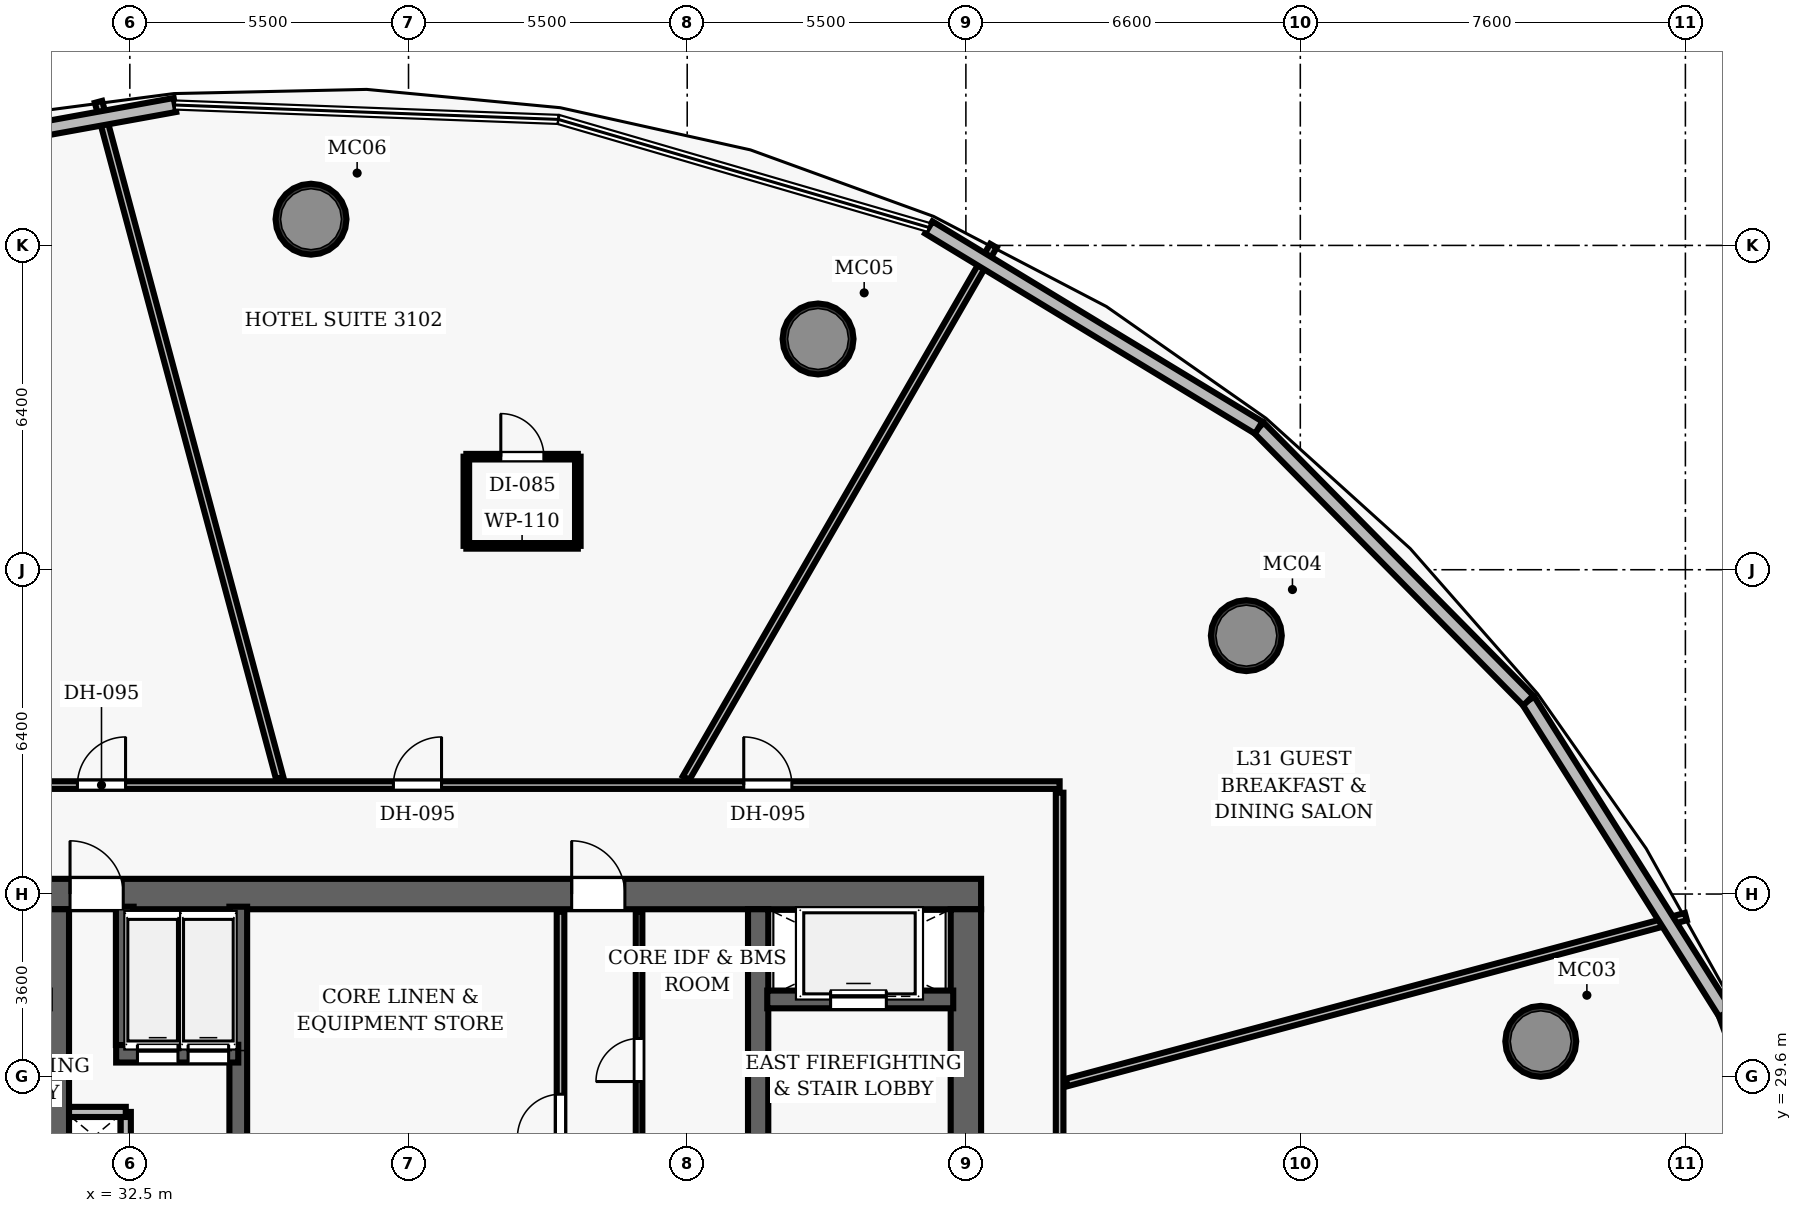
"""IFC4 building model, lengths in metres.
Left out: names, types, materials, properties, quantities, classifications, styles, units other than length and angle.
Written with IfcOpenShell. Run it as: python <this file> out.ifc"""

import sys

from ifc_helpers import new_model, si_unit, direction, frame, frame_2d, origin, origin_2d, place, context, subcontext, project, spatial, rectangle, hollow_circle, extrude, element, fill, save


model = new_model("IFC4")
c1 = context("Model", 3, precision=1e-05, world=origin(), true_north=direction((0.0, 1.0)))
c2 = subcontext(c1, "Body", "Model", "MODEL_VIEW")
j1 = project(units=[si_unit("LENGTHUNIT", "METRE"), si_unit("PLANEANGLEUNIT", "RADIAN")], contexts=[c1])
p1 = place(None, origin())
s1 = spatial("IfcSite", under=j1, at=p1, CompositionType="ELEMENT")
p2 = place(p1, origin())
s2 = spatial("IfcBuilding", under=s1, at=p2, CompositionType="ELEMENT")
p3 = place(p2, frame((0.0, 0.0, 127.3)))
s3 = spatial("IfcBuildingStorey", under=s2, at=p3, CompositionType="ELEMENT", Elevation=127.3)
p4 = place(p3, frame((26.7, 33.2, 0.0), z_axis=(0.0, 0.0, 1.0), x_axis=(1.0, 0.0, 0.0)))
e1 = element("IfcWall", 1, at=p4, inside=s3, PredefinedType="SHEAR", context=c2, shape_type="SweptSolid", body=[
    extrude(rectangle(XDim=22.6, YDim=0.6, at=frame_2d((11.3, 0.0))), origin(), (0.0, 0.0, 1.0), 3.5),
])
p5 = place(p4, frame((4.62, 0.0, 0.0)))
e2 = element("IfcOpeningElement", 2, at=p5, cuts=e1, PredefinedType="OPENING", context=c2, shape_type="SweptSolid", body=[
    extrude(rectangle(XDim=1.05, YDim=2.15, at=frame_2d((0.525, 1.075))), frame((0.0, 0.31, 0.0), z_axis=(0.0, -1.0, 0.0), x_axis=(1.0, 0.0, 0.0)), (0.0, 0.0, 1.0), 0.62),
])
p6 = place(p4, frame((14.52, 0.0, 0.0)))
e3 = element("IfcOpeningElement", 3, at=p6, cuts=e1, PredefinedType="OPENING", context=c2, shape_type="SweptSolid", body=[
    extrude(rectangle(XDim=1.05, YDim=2.15, at=frame_2d((0.525, 1.075))), frame((0.0, 0.31, 0.0), z_axis=(0.0, -1.0, 0.0), x_axis=(1.0, 0.0, 0.0)), (0.0, 0.0, 1.0), 0.62),
])
p7 = place(p3, frame((49.0, 19.1, 0.0), z_axis=(0.0, 0.0, 1.0), x_axis=(0.0, 1.0, 0.0)))
e4 = element("IfcWall", 4, at=p7, inside=s3, PredefinedType="SHEAR", context=c2, shape_type="SweptSolid", body=[
    extrude(rectangle(XDim=13.8, YDim=0.6, at=frame_2d((6.9, 0.0))), origin(), (0.0, 0.0, 1.0), 3.5),
])
p8 = place(p7, frame((8.2, 0.0, 0.0)))
e5 = element("IfcOpeningElement", 5, at=p8, cuts=e4, PredefinedType="OPENING", context=c2, shape_type="SweptSolid", body=[
    extrude(rectangle(XDim=1.05, YDim=2.15, at=frame_2d((0.525, 1.075))), frame((0.0, 0.31, 0.0), z_axis=(0.0, -1.0, 0.0), x_axis=(1.0, 0.0, 0.0)), (0.0, 0.0, 1.0), 0.62),
])
for number, where, z_axis, x_axis in (
    (6, (31.1, 19.1, 0.0), (0.0, 0.0, 1.0), (0.0, 1.0, 0.0)),
    (7, (44.9, 19.1, 0.0), (0.0, 0.0, 1.0), (0.0, 1.0, 0.0)),
):
    element("IfcWall", number, at=place(p3, frame(where, z_axis=z_axis, x_axis=x_axis)), inside=s3, PredefinedType="SHEAR", context=c2, shape_type="SweptSolid", body=[
        extrude(rectangle(XDim=13.8, YDim=0.4, at=frame_2d((6.9, 0.0))), origin(), (0.0, 0.0, 1.0), 3.5),
    ])
for number, where, z_axis, x_axis in (
    (8, (60.346, 30.293, 0.0), (0.0, 0.0, 1.0), (1.0, 0.0, 0.0)),
    (9, (54.535, 38.299, 0.0), (0.0, 0.0, 1.0), (1.0, 0.0, 0.0)),
    (10, (46.083, 44.154, 0.0), (0.0, 0.0, 1.0), (1.0, 0.0, 0.0)),
    (11, (36.076, 46.517, 0.0), (0.0, 0.0, 1.0), (1.0, 0.0, 0.0)),
):
    element("IfcColumn", number, at=place(p3, frame(where, z_axis=z_axis, x_axis=x_axis)), inside=s3, PredefinedType="COLUMN", context=c2, shape_type="SweptSolid", body=[
        extrude(hollow_circle(Radius=0.7, WallThickness=0.055, at=origin_2d()), origin(), (0.0, 0.0, 1.0), 3.5),
    ])
p9 = place(p3, frame((45.08, 31.12, 0.0), z_axis=(0.0, 0.0, 1.0), x_axis=(1.0, 0.0, 0.0)))
e12 = element("IfcWall", 12, at=p9, inside=s3, PredefinedType="SHEAR", context=c2, shape_type="SweptSolid", body=[
    extrude(rectangle(XDim=3.67, YDim=0.35, at=frame_2d((1.835, 0.0))), origin(), (0.0, 0.0, 1.0), 2.675),
])
p10 = place(p9, frame((1.25, 0.0, 0.0)))
e13 = element("IfcOpeningElement", 13, at=p10, cuts=e12, PredefinedType="OPENING", context=c2, shape_type="SweptSolid", body=[
    extrude(rectangle(XDim=1.1, YDim=2.15, at=frame_2d((0.55, 1.075))), frame((0.0, 0.185, 0.0), z_axis=(0.0, -1.0, 0.0), x_axis=(1.0, 0.0, 0.0)), (0.0, 0.0, 1.0), 0.37),
])
p11 = place(p3, frame((34.64, 26.69, 0.0), z_axis=(0.0, 0.0, 1.0), x_axis=(0.0, 1.0, 0.0)))
e14 = element("IfcWall", 14, at=p11, inside=s3, PredefinedType="SHEAR", context=c2, shape_type="SweptSolid", body=[
    extrude(rectangle(XDim=6.26, YDim=0.35, at=frame_2d((3.13, 0.0))), origin(), (0.0, 0.0, 1.0), 3.5),
])
p12 = place(p3, frame((32.23, 30.05, 0.0), z_axis=(0.0, 0.0, 1.0), x_axis=(1.0, 0.0, 0.0)))
e15 = element("IfcWall", 15, at=p12, inside=s3, PredefinedType="SHEAR", context=c2, shape_type="SweptSolid", body=[
    extrude(rectangle(XDim=2.41, YDim=0.35, at=frame_2d((1.205, 0.0))), origin(), (0.0, 0.0, 1.0), 2.675),
])
p13 = place(p12, frame((0.42, 0.0, 0.0)))
e16 = element("IfcOpeningElement", 16, at=p13, cuts=e15, PredefinedType="OPENING", context=c2, shape_type="SweptSolid", body=[
    extrude(rectangle(XDim=0.8, YDim=2.15, at=frame_2d((0.4, 1.075))), frame((0.0, 0.185, 0.0), z_axis=(0.0, -1.0, 0.0), x_axis=(1.0, 0.0, 0.0)), (0.0, 0.0, 1.0), 0.37),
])
p14 = place(p12, frame((1.42, 0.0, 0.0)))
e17 = element("IfcOpeningElement", 17, at=p14, cuts=e15, PredefinedType="OPENING", context=c2, shape_type="SweptSolid", body=[
    extrude(rectangle(XDim=0.8, YDim=2.15, at=frame_2d((0.4, 1.075))), frame((0.0, 0.185, 0.0), z_axis=(0.0, -1.0, 0.0), x_axis=(1.0, 0.0, 0.0)), (0.0, 0.0, 1.0), 0.37),
])
p15 = place(p3, frame((32.4, 30.22, 0.0), z_axis=(0.0, 0.0, 1.0), x_axis=(0.0, 1.0, 0.0)))
e18 = element("IfcWall", 18, at=p15, inside=s3, PredefinedType="SHEAR", context=c2, shape_type="SweptSolid", body=[
    extrude(rectangle(XDim=2.73, YDim=0.35, at=frame_2d((1.365, 0.0))), origin(), (0.0, 0.0, 1.0), 2.675),
])
p16 = place(p3, frame((32.42, 26.86, 0.0), z_axis=(0.0, 0.0, 1.0), x_axis=(0.0, 1.0, 0.0)))
e19 = element("IfcWall", 19, at=p16, inside=s3, PredefinedType="PARTITIONING", context=c2, shape_type="SweptSolid", body=[
    extrude(rectangle(XDim=2.04, YDim=0.2, at=frame_2d((1.02, 0.0))), origin(), (0.0, 0.0, 1.0), 2.675),
])
p17 = place(p16, frame((0.14, 0.0, 0.0)))
e20 = element("IfcOpeningElement", 20, at=p17, cuts=e19, PredefinedType="OPENING", context=c2, shape_type="SweptSolid", body=[
    extrude(rectangle(XDim=0.8, YDim=2.05, at=frame_2d((0.4, 1.025))), frame((0.0, 0.11, 0.0), z_axis=(0.0, -1.0, 0.0), x_axis=(1.0, 0.0, 0.0)), (0.0, 0.0, 1.0), 0.22),
])
p18 = place(p3, frame((31.3, 28.9, 0.0), z_axis=(0.0, 0.0, 1.0), x_axis=(1.0, 0.0, 0.0)))
e21 = element("IfcWall", 21, at=p18, inside=s3, PredefinedType="PARTITIONING", context=c2, shape_type="SweptSolid", body=[
    extrude(rectangle(XDim=1.12, YDim=0.2, at=frame_2d((0.56, 0.0))), origin(), (0.0, 0.0, 1.0), 2.675),
])
p19 = place(p3, frame((41.0, 23.05, 0.0), z_axis=(0.0, 0.0, 1.0), x_axis=(0.0, 1.0, 0.0)))
e22 = element("IfcWall", 22, at=p19, inside=s3, PredefinedType="PARTITIONING", context=c2, shape_type="SweptSolid", body=[
    extrude(rectangle(XDim=9.8, YDim=0.15, at=frame_2d((4.9, 0.0))), origin(), (0.0, 0.0, 1.0), 2.675),
])
p20 = place(p19, frame((5.35, 0.0, 0.0)))
e23 = element("IfcOpeningElement", 23, at=p20, cuts=e22, PredefinedType="OPENING", context=c2, shape_type="SweptSolid", body=[
    extrude(rectangle(XDim=0.85, YDim=2.1, at=frame_2d((0.425, 1.05))), frame((0.0, 0.085, 0.0), z_axis=(0.0, -1.0, 0.0), x_axis=(1.0, 0.0, 0.0)), (0.0, 0.0, 1.0), 0.17),
])
p21 = place(p19, frame((0.45, 0.0, 0.0)))
e24 = element("IfcOpeningElement", 24, at=p21, cuts=e22, PredefinedType="OPENING", context=c2, shape_type="SweptSolid", body=[
    extrude(rectangle(XDim=0.85, YDim=2.1, at=frame_2d((0.425, 1.05))), frame((0.0, 0.085, 0.0), z_axis=(0.0, -1.0, 0.0), x_axis=(1.0, 0.0, 0.0)), (0.0, 0.0, 1.0), 0.17),
])
p22 = place(p3, frame((42.55, 28.1, 0.0), z_axis=(0.0, 0.0, 1.0), x_axis=(0.0, 1.0, 0.0)))
e25 = element("IfcWall", 25, at=p22, inside=s3, PredefinedType="PARTITIONING", context=c2, shape_type="SweptSolid", body=[
    extrude(rectangle(XDim=4.75, YDim=0.13, at=frame_2d((2.375, 0.0))), origin(), (0.0, 0.0, 1.0), 2.675),
])
p23 = place(p22, frame((1.4, 0.0, 0.0)))
e26 = element("IfcOpeningElement", 26, at=p23, cuts=e25, PredefinedType="OPENING", context=c2, shape_type="SweptSolid", body=[
    extrude(rectangle(XDim=0.85, YDim=2.1, at=frame_2d((0.425, 1.05))), frame((0.0, 0.075, 0.0), z_axis=(0.0, -1.0, 0.0), x_axis=(1.0, 0.0, 0.0)), (0.0, 0.0, 1.0), 0.15),
])
p24 = place(p3, frame((24.85, 35.35, 0.0), z_axis=(0.0, 0.0, 1.0), x_axis=(1.0, 0.0, 0.0)))
e27 = element("IfcWall", 27, at=p24, inside=s3, PredefinedType="PARTITIONING", context=c2, shape_type="SweptSolid", body=[
    extrude(rectangle(XDim=26.0, YDim=0.15, at=frame_2d((13.0, 0.0))), origin(), (0.0, 0.0, 1.0), 2.675),
])
p25 = place(p24, frame((19.766, 0.0, 0.0)))
e28 = element("IfcOpeningElement", 28, at=p25, cuts=e27, PredefinedType="OPENING", context=c2, shape_type="SweptSolid", body=[
    extrude(rectangle(XDim=0.95, YDim=2.15, at=frame_2d((0.475, 1.075))), frame((0.0, 0.085, 0.0), z_axis=(0.0, -1.0, 0.0), x_axis=(1.0, 0.0, 0.0)), (0.0, 0.0, 1.0), 0.17),
])
p26 = place(p24, frame((12.852, 0.0, 0.0)))
e29 = element("IfcOpeningElement", 29, at=p26, cuts=e27, PredefinedType="OPENING", context=c2, shape_type="SweptSolid", body=[
    extrude(rectangle(XDim=0.95, YDim=2.15, at=frame_2d((0.475, 1.075))), frame((0.0, 0.085, 0.0), z_axis=(0.0, -1.0, 0.0), x_axis=(1.0, 0.0, 0.0)), (0.0, 0.0, 1.0), 0.17),
])
p27 = place(p24, frame((6.616, 0.0, 0.0)))
e30 = element("IfcOpeningElement", 30, at=p27, cuts=e27, PredefinedType="OPENING", context=c2, shape_type="SweptSolid", body=[
    extrude(rectangle(XDim=0.95, YDim=2.15, at=frame_2d((0.475, 1.075))), frame((0.0, 0.085, 0.0), z_axis=(0.0, -1.0, 0.0), x_axis=(1.0, 0.0, 0.0)), (0.0, 0.0, 1.0), 0.17),
])
p28 = place(p3, frame((50.85, 27.08, 0.0), z_axis=(0.0, 0.0, 1.0), x_axis=(0.0, 1.0, 0.0)))
e31 = element("IfcWall", 31, at=p28, inside=s3, PredefinedType="PARTITIONING", context=c2, shape_type="SweptSolid", body=[
    extrude(rectangle(XDim=8.12, YDim=0.15, at=frame_2d((4.06, 0.0))), origin(), (0.0, 0.0, 1.0), 2.675),
])
p29 = place(p3, frame((50.99, 29.481, 0.0), z_axis=(0.0, 0.0, 1.0), x_axis=(0.965926429522, 0.258816793797, 0.0)))
e32 = element("IfcWall", 32, at=p29, inside=s3, PredefinedType="PARTITIONING", context=c2, shape_type="SweptSolid", body=[
    extrude(rectangle(XDim=12.651, YDim=0.15, at=frame_2d((6.325, 0.0))), origin(), (0.0, 0.0, 1.0), 2.675),
])
p30 = place(p3, frame((43.479, 35.49, 0.0), z_axis=(0.0, 0.0, 1.0), x_axis=(0.50000357382, 0.866023340428, 0.0)))
e33 = element("IfcWall", 33, at=p30, inside=s3, PredefinedType="PARTITIONING", context=c2, shape_type="SweptSolid", body=[
    extrude(rectangle(XDim=12.128, YDim=0.15, at=frame_2d((6.064, 0.0))), origin(), (0.0, 0.0, 1.0), 2.675),
])
p31 = place(p3, frame((35.457, 35.49, 0.0), z_axis=(0.0, 0.0, 1.0), x_axis=(-0.258827369618, 0.965923595704, 0.0)))
e34 = element("IfcWall", 34, at=p31, inside=s3, PredefinedType="PARTITIONING", context=c2, shape_type="SweptSolid", body=[
    extrude(rectangle(XDim=13.814, YDim=0.15, at=frame_2d((6.907, 0.0))), origin(), (0.0, 0.0, 1.0), 2.675),
])
p32 = place(p3, frame((39.141, 40.071, 0.0), z_axis=(0.0, 0.0, 1.0), x_axis=(1.0, 0.0, 0.0)))
e35 = element("IfcWall", 35, at=p32, inside=s3, PredefinedType="PARTITIONING", context=c2, shape_type="SweptSolid", body=[
    extrude(rectangle(XDim=2.2, YDim=0.11, at=frame_2d((1.1, 0.0))), origin(), (0.0, 0.0, 1.0), 2.675),
])
p33 = place(p3, frame((39.141, 41.831, 0.0), z_axis=(0.0, 0.0, 1.0), x_axis=(1.0, 0.0, 0.0)))
e36 = element("IfcWall", 36, at=p33, inside=s3, PredefinedType="PARTITIONING", context=c2, shape_type="SweptSolid", body=[
    extrude(rectangle(XDim=2.2, YDim=0.11, at=frame_2d((1.1, 0.0))), origin(), (0.0, 0.0, 1.0), 2.675),
])
p34 = place(p33, frame((0.68, 0.0, 0.0)))
e37 = element("IfcOpeningElement", 37, at=p34, cuts=e36, PredefinedType="OPENING", context=c2, shape_type="SweptSolid", body=[
    extrude(rectangle(XDim=0.85, YDim=2.1, at=frame_2d((0.425, 1.05))), frame((0.0, 0.065, 0.0), z_axis=(0.0, -1.0, 0.0), x_axis=(1.0, 0.0, 0.0)), (0.0, 0.0, 1.0), 0.13),
])
for number, where, z_axis, x_axis in (
    (38, (39.141, 40.071, 0.0), (0.0, 0.0, 1.0), (0.0, 1.0, 0.0)),
    (39, (41.341, 40.071, 0.0), (0.0, 0.0, 1.0), (0.0, 1.0, 0.0)),
):
    element("IfcWall", number, at=place(p3, frame(where, z_axis=z_axis, x_axis=x_axis)), inside=s3, PredefinedType="PARTITIONING", context=c2, shape_type="SweptSolid", body=[
        extrude(rectangle(XDim=1.76, YDim=0.11, at=frame_2d((0.88, 0.0))), origin(), (0.0, 0.0, 1.0), 2.675),
    ])
p35 = place(p3, frame((63.988, 30.85, 0.0), z_axis=(0.0, 0.0, 1.0), x_axis=(0.347548177942, -0.937662126786, 0.0)))
e40 = element("IfcWall", 40, at=p35, inside=s3, PredefinedType="SOLIDWALL", context=c2, shape_type="SweptSolid", body=[
    extrude(rectangle(XDim=6.665, YDim=0.28, at=frame_2d((3.333, 0.0))), origin(), (0.0, 0.0, 1.0), 3.26),
])
p36 = place(p3, frame((60.099, 37.019, 0.0), z_axis=(0.0, 0.0, 1.0), x_axis=(0.533224356751, -0.845973868017, 0.0)))
e41 = element("IfcWall", 41, at=p36, inside=s3, PredefinedType="SOLIDWALL", context=c2, shape_type="SweptSolid", body=[
    extrude(rectangle(XDim=7.292, YDim=0.28, at=frame_2d((3.646, 0.0))), origin(), (0.0, 0.0, 1.0), 3.26),
])
p37 = place(p3, frame((54.78, 42.404, 0.0), z_axis=(0.0, 0.0, 1.0), x_axis=(0.702787728891, -0.711399612117, 0.0)))
e42 = element("IfcWall", 42, at=p37, inside=s3, PredefinedType="SOLIDWALL", context=c2, shape_type="SweptSolid", body=[
    extrude(rectangle(XDim=7.569, YDim=0.28, at=frame_2d((3.785, 0.0))), origin(), (0.0, 0.0, 1.0), 3.26),
])
p38 = place(p3, frame((48.268, 46.355, 0.0), z_axis=(0.0, 0.0, 1.0), x_axis=(0.854928651423, -0.518745603332, 0.0)))
e43 = element("IfcWall", 43, at=p38, inside=s3, PredefinedType="SOLIDWALL", context=c2, shape_type="SweptSolid", body=[
    extrude(rectangle(XDim=7.617, YDim=0.28, at=frame_2d((3.809, 0.0))), origin(), (0.0, 0.0, 1.0), 3.26),
])
p39 = place(p3, frame((26.216, 47.47, 0.0), z_axis=(0.0, 0.0, 1.0), x_axis=(0.983958718809, 0.178396299514, 0.0)))
e44 = element("IfcWall", 44, at=p39, inside=s3, PredefinedType="SOLIDWALL", context=c2, shape_type="SweptSolid", body=[
    extrude(rectangle(XDim=7.292, YDim=0.28, at=frame_2d((3.646, 0.0))), origin(), (0.0, 0.0, 1.0), 3.26),
])
p40 = place(p5, origin())
e45 = element("IfcDoor", 45, at=p40, inside=s3, OperationType="SINGLE_SWING_LEFT", PredefinedType="DOOR", context=c2, shape_type="SweptSolid", body=[
    extrude(rectangle(XDim=1.05, YDim=2.15, at=frame_2d((0.525, 1.075))), frame((0.0, 0.025, 0.0), z_axis=(0.0, -1.0, 0.0), x_axis=(1.0, 0.0, 0.0)), (0.0, 0.0, 1.0), 0.05),
])
fill(e2, e45)
p41 = place(p6, origin())
e46 = element("IfcDoor", 46, at=p41, inside=s3, OperationType="SINGLE_SWING_LEFT", PredefinedType="DOOR", context=c2, shape_type="SweptSolid", body=[
    extrude(rectangle(XDim=1.05, YDim=2.15, at=frame_2d((0.525, 1.075))), frame((0.0, 0.025, 0.0), z_axis=(0.0, -1.0, 0.0), x_axis=(1.0, 0.0, 0.0)), (0.0, 0.0, 1.0), 0.05),
])
fill(e3, e46)
p42 = place(p20, origin())
e47 = element("IfcDoor", 47, at=p42, inside=s3, OperationType="SINGLE_SWING_LEFT", PredefinedType="DOOR", context=c2, shape_type="SweptSolid", body=[
    extrude(rectangle(XDim=0.85, YDim=2.1, at=frame_2d((0.425, 1.05))), frame((0.0, 0.025, 0.0), z_axis=(0.0, -1.0, 0.0), x_axis=(1.0, 0.0, 0.0)), (0.0, 0.0, 1.0), 0.05),
])
fill(e23, e47)
p43 = place(p23, origin())
e48 = element("IfcDoor", 48, at=p43, inside=s3, OperationType="SINGLE_SWING_LEFT", PredefinedType="DOOR", context=c2, shape_type="SweptSolid", body=[
    extrude(rectangle(XDim=0.85, YDim=2.1, at=frame_2d((0.425, 1.05))), frame((0.0, 0.025, 0.0), z_axis=(0.0, -1.0, 0.0), x_axis=(1.0, 0.0, 0.0)), (0.0, 0.0, 1.0), 0.05),
])
fill(e26, e48)
p44 = place(p25, origin())
e49 = element("IfcDoor", 49, at=p44, inside=s3, OperationType="SINGLE_SWING_LEFT", PredefinedType="DOOR", context=c2, shape_type="SweptSolid", body=[
    extrude(rectangle(XDim=0.95, YDim=2.15, at=frame_2d((0.475, 1.075))), frame((0.0, 0.025, 0.0), z_axis=(0.0, -1.0, 0.0), x_axis=(1.0, 0.0, 0.0)), (0.0, 0.0, 1.0), 0.05),
])
fill(e28, e49)
p45 = place(p26, origin())
e50 = element("IfcDoor", 50, at=p45, inside=s3, OperationType="SINGLE_SWING_RIGHT", PredefinedType="DOOR", context=c2, shape_type="SweptSolid", body=[
    extrude(rectangle(XDim=0.95, YDim=2.15, at=frame_2d((0.475, 1.075))), frame((0.0, 0.025, 0.0), z_axis=(0.0, -1.0, 0.0), x_axis=(1.0, 0.0, 0.0)), (0.0, 0.0, 1.0), 0.05),
])
fill(e29, e50)
p46 = place(p34, origin())
e51 = element("IfcDoor", 51, at=p46, inside=s3, OperationType="SINGLE_SWING_LEFT", PredefinedType="DOOR", context=c2, shape_type="SweptSolid", body=[
    extrude(rectangle(XDim=0.85, YDim=2.1, at=frame_2d((0.425, 1.05))), frame((0.0, 0.025, 0.0), z_axis=(0.0, -1.0, 0.0), x_axis=(1.0, 0.0, 0.0)), (0.0, 0.0, 1.0), 0.05),
])
fill(e37, e51)
p47 = place(p27, origin())
e52 = element("IfcDoor", 52, at=p47, inside=s3, OperationType="SINGLE_SWING_RIGHT", PredefinedType="DOOR", context=c2, shape_type="SweptSolid", body=[
    extrude(rectangle(XDim=0.95, YDim=2.15, at=frame_2d((0.475, 1.075))), frame((0.0, 0.025, 0.0), z_axis=(0.0, -1.0, 0.0), x_axis=(1.0, 0.0, 0.0)), (0.0, 0.0, 1.0), 0.05),
])
fill(e30, e52)
p48 = place(p10, origin())
e53 = element("IfcDoor", 53, at=p48, inside=s3, OperationType="SLIDING_TO_LEFT", PredefinedType="DOOR", context=c2, shape_type="SweptSolid", body=[
    extrude(rectangle(XDim=1.1, YDim=2.15, at=frame_2d((0.55, 1.075))), frame((0.0, 0.025, 0.0), z_axis=(0.0, -1.0, 0.0), x_axis=(1.0, 0.0, 0.0)), (0.0, 0.0, 1.0), 0.05),
])
fill(e13, e53)
p49 = place(p13, origin())
e54 = element("IfcDoor", 54, at=p49, inside=s3, OperationType="SLIDING_TO_LEFT", PredefinedType="DOOR", context=c2, shape_type="SweptSolid", body=[
    extrude(rectangle(XDim=0.8, YDim=2.15, at=frame_2d((0.4, 1.075))), frame((0.0, 0.025, 0.0), z_axis=(0.0, -1.0, 0.0), x_axis=(1.0, 0.0, 0.0)), (0.0, 0.0, 1.0), 0.05),
])
fill(e16, e54)
p50 = place(p14, origin())
e55 = element("IfcDoor", 55, at=p50, inside=s3, OperationType="SLIDING_TO_LEFT", PredefinedType="DOOR", context=c2, shape_type="SweptSolid", body=[
    extrude(rectangle(XDim=0.8, YDim=2.15, at=frame_2d((0.4, 1.075))), frame((0.0, 0.025, 0.0), z_axis=(0.0, -1.0, 0.0), x_axis=(1.0, 0.0, 0.0)), (0.0, 0.0, 1.0), 0.05),
])
fill(e17, e55)
save(model, sys.argv[1])
